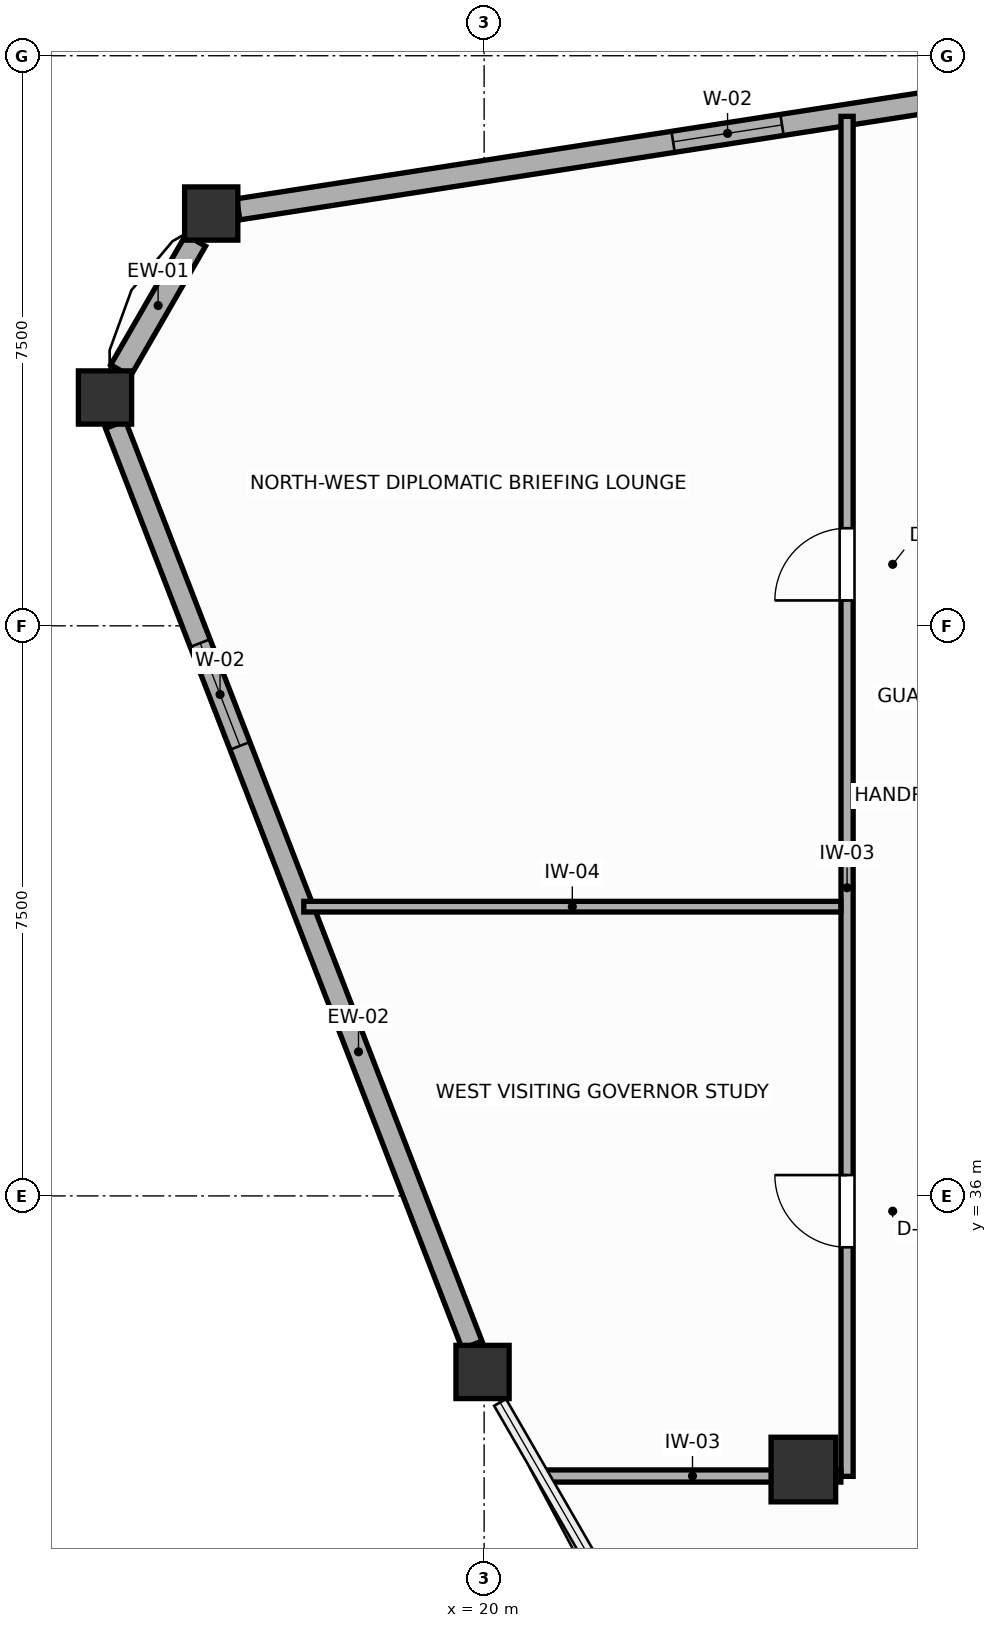
"""IFC4 building model, lengths in metres.
Left out: names, types, materials, properties, quantities, classifications, styles, units other than length and angle.
Written with IfcOpenShell. Run it as: python <this file> out.ifc"""

import sys

from ifc_helpers import new_model, si_unit, direction, frame, frame_2d, origin, origin_2d, place, context, subcontext, project, spatial, rectangle, extrude, source, transform, mapped, element, fill, save


model = new_model("IFC4")
c1 = context("Model", 3, precision=1e-05, world=origin(), true_north=direction((0.0, 1.0)))
c2 = subcontext(c1, "Body", "Model", "MODEL_VIEW")
j1 = project(units=[si_unit("LENGTHUNIT", "METRE"), si_unit("PLANEANGLEUNIT", "RADIAN")], contexts=[c1])
p1 = place(None, origin())
s1 = spatial("IfcSite", under=j1, at=p1, CompositionType="ELEMENT")
p2 = place(p1, origin())
s2 = spatial("IfcBuilding", under=s1, at=p2, CompositionType="ELEMENT")
p3 = place(p2, frame((0.0, 0.0, 246.6)))
s3 = spatial("IfcBuildingStorey", under=s2, at=p3, CompositionType="ELEMENT", Elevation=246.6)
m1 = source(origin(), c2, "Body", "SweptSolid", [
    extrude(rectangle(XDim=0.85, YDim=0.85, at=origin_2d()), origin(), (0.0, 0.0, 1.0), 3.6),
])
p4 = place(p3, frame((24.2, 32.4, 0.0), z_axis=(0.0, 0.0, 1.0), x_axis=(1.0, 0.0, 0.0)))
e1 = element("IfcColumn", 1, at=p4, inside=s3, PredefinedType="COLUMN", context=c2, shape_type="MappedRepresentation", body=[
    mapped(m1, transform((0.0, 0.0, 0.0), scale=1.0)),
])
m2 = source(origin(), c2, "Body", "SweptSolid", [
    extrude(rectangle(XDim=0.7, YDim=0.7, at=origin_2d()), origin(), (0.0, 0.0, 1.0), 3.6),
])
for number, where, z_axis, x_axis in (
    (2, (16.41, 48.924, 0.0), (0.0, 0.0, 1.0), (1.0, 0.0, 0.0)),
    (3, (15.012, 46.504, 0.0), (0.0, 0.0, 1.0), (1.0, 0.0, 0.0)),
    (4, (19.979, 33.684, 0.0), (0.0, 0.0, 1.0), (1.0, 0.0, 0.0)),
):
    element("IfcColumn", number, at=place(p3, frame(where, z_axis=z_axis, x_axis=x_axis)), inside=s3, PredefinedType="COLUMN", context=c2, shape_type="MappedRepresentation", body=[
        mapped(m2, transform((0.0, 0.0, 0.0), scale=1.0)),
    ])
p5 = place(p3, frame((29.641, 50.978, 0.0), z_axis=(0.0, 0.0, 1.0), x_axis=(-0.988170476673, -0.153359411293, 0.0)))
e5 = element("IfcWall", 5, at=p5, inside=s3, PredefinedType="SOLIDWALL", context=c2, shape_type="SweptSolid", body=[
    extrude(rectangle(XDim=13.03, YDim=0.28, at=frame_2d((6.515, 0.0))), origin(), (0.0, 0.0, 1.0), 3.08),
])
p6 = place(p5, frame((5.79, 0.0, 0.75)))
e6 = element("IfcOpeningElement", 6, at=p6, cuts=e5, PredefinedType="OPENING", context=c2, shape_type="SweptSolid", body=[
    extrude(rectangle(XDim=1.45, YDim=1.65, at=frame_2d((0.725, 0.825))), frame((0.0, 0.15, 0.0), z_axis=(0.0, -1.0, 0.0), x_axis=(1.0, 0.0, 0.0)), (0.0, 0.0, 1.0), 0.3),
])
p7 = place(p3, frame((16.205, 48.569, 0.0), z_axis=(0.0, 0.0, 1.0), x_axis=(-0.499915072674, -0.866074431047, 0.0)))
e7 = element("IfcWall", 7, at=p7, inside=s3, PredefinedType="SOLIDWALL", context=c2, shape_type="SweptSolid", body=[
    extrude(rectangle(XDim=1.975, YDim=0.3, at=frame_2d((0.987, 0.0))), origin(), (0.0, 0.0, 1.0), 3.08),
])
p8 = place(p3, frame((15.15, 46.149, 0.0), z_axis=(0.0, 0.0, 1.0), x_axis=(0.361269378379, -0.93246149317, 0.0)))
e8 = element("IfcWall", 8, at=p8, inside=s3, PredefinedType="SOLIDWALL", context=c2, shape_type="SweptSolid", body=[
    extrude(rectangle(XDim=12.987, YDim=0.28, at=frame_2d((6.494, 0.0))), origin(), (0.0, 0.0, 1.0), 3.05),
])
p9 = place(p8, frame((3.084, 0.0, 0.75)))
e9 = element("IfcOpeningElement", 9, at=p9, cuts=e8, PredefinedType="OPENING", context=c2, shape_type="SweptSolid", body=[
    extrude(rectangle(XDim=1.45, YDim=1.65, at=frame_2d((0.725, 0.825))), frame((0.0, 0.15, 0.0), z_axis=(0.0, -1.0, 0.0), x_axis=(1.0, 0.0, 0.0)), (0.0, 0.0, 1.0), 0.3),
])
p10 = place(p3, frame((24.775, 32.31, 0.0), z_axis=(0.0, 0.0, 1.0), x_axis=(0.0, 1.0, 0.0)))
e10 = element("IfcWall", 10, at=p10, inside=s3, PredefinedType="PARTITIONING", context=c2, shape_type="SweptSolid", body=[
    extrude(rectangle(XDim=17.892, YDim=0.16, at=frame_2d((8.946, 0.0))), origin(), (0.0, 0.0, 1.0), 3.41),
])
p11 = place(p10, frame((3.014, 0.0, 0.0)))
e11 = element("IfcOpeningElement", 11, at=p11, cuts=e10, PredefinedType="OPENING", context=c2, shape_type="SweptSolid", body=[
    extrude(rectangle(XDim=0.95, YDim=2.05, at=frame_2d((0.475, 1.025))), frame((0.0, 0.09, 0.0), z_axis=(0.0, -1.0, 0.0), x_axis=(1.0, 0.0, 0.0)), (0.0, 0.0, 1.0), 0.18),
])
p12 = place(p10, frame((11.524, 0.0, 0.0)))
e12 = element("IfcOpeningElement", 12, at=p12, cuts=e10, PredefinedType="OPENING", context=c2, shape_type="SweptSolid", body=[
    extrude(rectangle(XDim=0.95, YDim=2.05, at=frame_2d((0.475, 1.025))), frame((0.0, 0.09, 0.0), z_axis=(0.0, -1.0, 0.0), x_axis=(1.0, 0.0, 0.0)), (0.0, 0.0, 1.0), 0.18),
])
p13 = place(p3, frame((20.789, 32.315, 0.0), z_axis=(0.0, 0.0, 1.0), x_axis=(1.0, 0.0, 0.0)))
e13 = element("IfcWall", 13, at=p13, inside=s3, PredefinedType="PARTITIONING", context=c2, shape_type="SweptSolid", body=[
    extrude(rectangle(XDim=3.904, YDim=0.16, at=frame_2d((1.952, 0.0))), origin(), (0.0, 0.0, 1.0), 3.08),
])
p14 = place(p3, frame((17.627, 39.805, 0.0), z_axis=(0.0, 0.0, 1.0), x_axis=(1.0, 0.0, 0.0)))
e14 = element("IfcWall", 14, at=p14, inside=s3, PredefinedType="PARTITIONING", context=c2, shape_type="SweptSolid", body=[
    extrude(rectangle(XDim=7.066, YDim=0.14, at=frame_2d((3.533, 0.0))), origin(), (0.0, 0.0, 1.0), 3.41),
])
p15 = place(p6, origin())
e15 = element("IfcWindow", 15, at=p15, inside=s3, PartitioningType="SINGLE_PANEL", PredefinedType="WINDOW", context=c2, shape_type="SweptSolid", body=[
    extrude(rectangle(XDim=1.45, YDim=1.65, at=frame_2d((0.725, 0.825))), frame((0.0, 0.03, 0.0), z_axis=(0.0, -1.0, 0.0), x_axis=(1.0, 0.0, 0.0)), (0.0, 0.0, 1.0), 0.06),
])
fill(e6, e15)
p16 = place(p9, origin())
e16 = element("IfcWindow", 16, at=p16, inside=s3, PartitioningType="SINGLE_PANEL", PredefinedType="WINDOW", context=c2, shape_type="SweptSolid", body=[
    extrude(rectangle(XDim=1.45, YDim=1.65, at=frame_2d((0.725, 0.825))), frame((0.0, 0.03, 0.0), z_axis=(0.0, -1.0, 0.0), x_axis=(1.0, 0.0, 0.0)), (0.0, 0.0, 1.0), 0.06),
])
fill(e9, e16)
p17 = place(p11, origin())
e17 = element("IfcDoor", 17, at=p17, inside=s3, OperationType="SINGLE_SWING_RIGHT", PredefinedType="DOOR", context=c2, shape_type="SweptSolid", body=[
    extrude(rectangle(XDim=0.95, YDim=2.05, at=frame_2d((0.475, 1.025))), frame((0.0, 0.025, 0.0), z_axis=(0.0, -1.0, 0.0), x_axis=(1.0, 0.0, 0.0)), (0.0, 0.0, 1.0), 0.05),
])
fill(e11, e17)
p18 = place(p12, origin())
e18 = element("IfcDoor", 18, at=p18, inside=s3, OperationType="SINGLE_SWING_LEFT", PredefinedType="DOOR", context=c2, shape_type="SweptSolid", body=[
    extrude(rectangle(XDim=0.95, YDim=2.05, at=frame_2d((0.475, 1.025))), frame((0.0, 0.025, 0.0), z_axis=(0.0, -1.0, 0.0), x_axis=(1.0, 0.0, 0.0)), (0.0, 0.0, 1.0), 0.05),
])
fill(e12, e18)
save(model, sys.argv[1])
